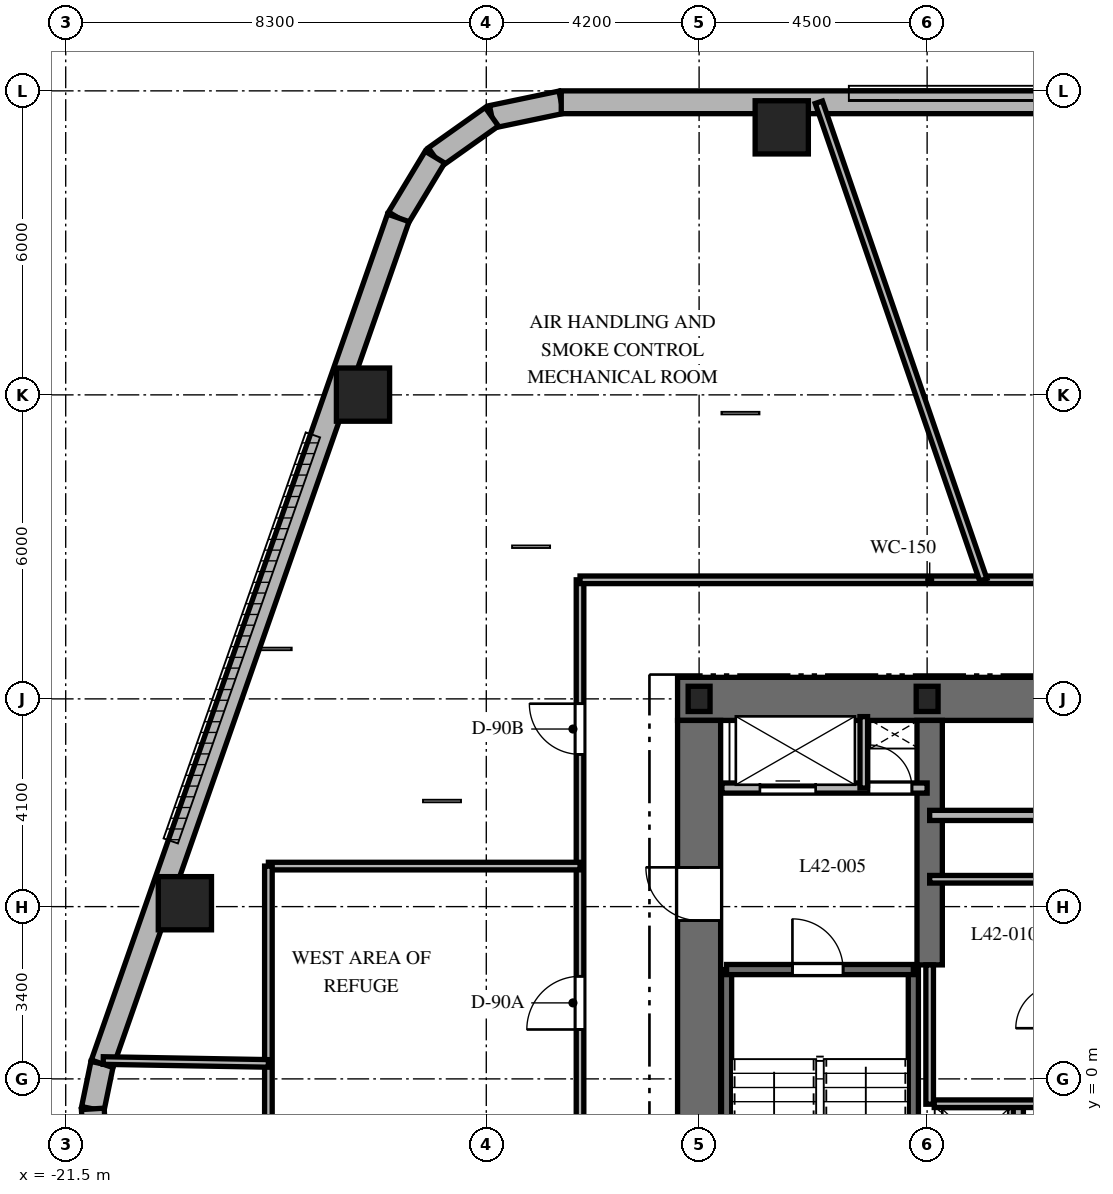
"""IFC4 building model, lengths in metres.
Left out: names, types, materials, properties, quantities, classifications, styles, units other than length and angle.
Written with IfcOpenShell. Run it as: python <this file> out.ifc"""

import sys

from ifc_helpers import new_model, si_unit, direction, frame, frame_2d, origin, origin_2d, place, context, subcontext, project, spatial, rectangle, i_section, extrude, element, fill, save


model = new_model("IFC4")
c1 = context("Model", 3, precision=1e-05, world=origin(), true_north=direction((0.0, 1.0)))
c2 = subcontext(c1, "Body", "Model", "MODEL_VIEW")
j1 = project(units=[si_unit("LENGTHUNIT", "METRE"), si_unit("PLANEANGLEUNIT", "RADIAN")], contexts=[c1])
p1 = place(None, origin())
s1 = spatial("IfcSite", under=j1, at=p1, CompositionType="ELEMENT")
p2 = place(p1, origin())
s2 = spatial("IfcBuilding", under=s1, at=p2, CompositionType="ELEMENT")
p3 = place(p2, frame((0.0, 0.0, 170.2)))
s3 = spatial("IfcBuildingStorey", under=s2, at=p3, CompositionType="ELEMENT", Elevation=170.2)
p4 = place(p3, frame((-9.425, 7.5, 0.0), z_axis=(0.0, 0.0, 1.0), x_axis=(1.0, 0.0, 0.0)))
e1 = element("IfcWall", 1, at=p4, inside=s3, PredefinedType="SHEAR", context=c2, shape_type="SweptSolid", body=[
    extrude(rectangle(XDim=9.475, YDim=0.85, at=frame_2d((4.738, 0.0))), origin(), (0.0, 0.0, 1.0), 5.4),
])
p5 = place(p3, frame((-9.0, -7.075, 0.0), z_axis=(0.0, 0.0, 1.0), x_axis=(0.0, 1.0, 0.0)))
e2 = element("IfcWall", 2, at=p5, inside=s3, PredefinedType="SHEAR", context=c2, shape_type="SweptSolid", body=[
    extrude(rectangle(XDim=14.15, YDim=0.85, at=frame_2d((7.075, 0.0))), origin(), (0.0, 0.0, 1.0), 5.4),
])
p6 = place(p5, frame((10.2, 0.0, 0.0)))
e3 = element("IfcOpeningElement", 3, at=p6, cuts=e2, PredefinedType="OPENING", context=c2, shape_type="SweptSolid", body=[
    extrude(rectangle(XDim=1.05, YDim=2.15, at=frame_2d((0.525, 1.075))), frame((0.0, 0.435, 0.0), z_axis=(0.0, -1.0, 0.0), x_axis=(1.0, 0.0, 0.0)), (0.0, 0.0, 1.0), 0.87),
])
p7 = place(p3, frame((-4.45, 2.25, 0.0), z_axis=(0.0, 0.0, 1.0), x_axis=(0.0, 1.0, 0.0)))
e4 = element("IfcWall", 4, at=p7, inside=s3, PredefinedType="SHEAR", context=c2, shape_type="SweptSolid", body=[
    extrude(rectangle(XDim=4.825, YDim=0.5, at=frame_2d((2.413, 0.0))), origin(), (0.0, 0.0, 1.0), 5.4),
])
for number, where, z_axis, x_axis in (
    (5, (-8.458, -6.985, 0.0), (0.0, 0.0, 1.0), (0.0, 1.0, 0.0)),
    (6, (-4.772, -6.985, 0.0), (0.0, 0.0, 1.0), (0.0, 1.0, 0.0)),
):
    element("IfcWall", number, at=place(p3, frame(where, z_axis=z_axis, x_axis=x_axis)), inside=s3, PredefinedType="SHEAR", context=c2, shape_type="SweptSolid", body=[
        extrude(rectangle(XDim=9.143, YDim=0.2, at=frame_2d((4.572, 0.0))), origin(), (0.0, 0.0, 1.0), 5.4),
    ])
p8 = place(p3, frame((-8.458, 2.158, 0.0), z_axis=(0.0, 0.0, 1.0), x_axis=(1.0, 0.0, 0.0)))
e7 = element("IfcWall", 7, at=p8, inside=s3, PredefinedType="SHEAR", context=c2, shape_type="SweptSolid", body=[
    extrude(rectangle(XDim=3.686, YDim=0.2, at=frame_2d((1.843, 0.0))), origin(), (0.0, 0.0, 1.0), 5.4),
])
p9 = place(p8, frame((1.3, 0.0, 0.0)))
e8 = element("IfcOpeningElement", 8, at=p9, cuts=e7, PredefinedType="OPENING", context=c2, shape_type="SweptSolid", body=[
    extrude(rectangle(XDim=1.0, YDim=2.15, at=frame_2d((0.5, 1.075))), frame((0.0, 0.11, 0.0), z_axis=(0.0, -1.0, 0.0), x_axis=(1.0, 0.0, 0.0)), (0.0, 0.0, 1.0), 0.22),
])
for number, where, z_axis, x_axis in (
    (9, (-4.5, 7.5, 0.0), (0.0, 0.0, 1.0), (1.0, 0.0, 0.0)),
    (10, (-9.0, 7.5, 0.0), (0.0, 0.0, 1.0), (1.0, 0.0, 0.0)),
):
    element("IfcColumn", number, at=place(p3, frame(where, z_axis=z_axis, x_axis=x_axis)), inside=s3, PredefinedType="COLUMN", context=c2, shape_type="SweptSolid", body=[
        extrude(i_section(OverallWidth=0.432, OverallDepth=0.498, WebThickness=0.056, FlangeThickness=0.089, at=origin_2d()), origin(), (0.0, 0.0, 1.0), 5.4),
    ])
for number, where, z_axis, x_axis in (
    (11, (-7.369, 18.78, 0.0), (0.0, 0.0, 1.0), (1.0, 0.0, 0.0)),
    (12, (-15.633, 13.505, 0.0), (0.0, 0.0, 1.0), (1.0, 0.0, 0.0)),
    (13, (-19.148, 3.467, 0.0), (0.0, 0.0, 1.0), (1.0, 0.0, 0.0)),
):
    element("IfcColumn", number, at=place(p3, frame(where, z_axis=z_axis, x_axis=x_axis)), inside=s3, PredefinedType="COLUMN", context=c2, shape_type="SweptSolid", body=[
        extrude(rectangle(XDim=1.05, YDim=1.05, at=origin_2d()), origin(), (0.0, 0.0, 1.0), 5.4),
    ])
p10 = place(p3, frame((-11.72, 19.275, 0.0), z_axis=(0.0, 0.0, 1.0), x_axis=(-0.97893106758, -0.204191001093, 0.0)))
e14 = element("IfcWall", 14, at=p10, inside=s3, PredefinedType="SOLIDWALL", context=c2, shape_type="SweptSolid", body=[
    extrude(rectangle(XDim=1.4, YDim=0.45, at=frame_2d((0.7, 0.0))), origin(), (0.0, 0.0, 1.0), 5.1),
])
p11 = place(p3, frame((-13.091, 18.989, 0.0), z_axis=(0.0, 0.0, 1.0), x_axis=(-0.815574637848, -0.578651890258, 0.0)))
e15 = element("IfcWall", 15, at=p11, inside=s3, PredefinedType="SOLIDWALL", context=c2, shape_type="SweptSolid", body=[
    extrude(rectangle(XDim=1.377, YDim=0.45, at=frame_2d((0.688, 0.0))), origin(), (0.0, 0.0, 1.0), 5.1),
])
p12 = place(p3, frame((-14.214, 18.192, 0.0), z_axis=(0.0, 0.0, 1.0), x_axis=(-0.516340945502, -0.856383108193, 0.0)))
e16 = element("IfcWall", 16, at=p12, inside=s3, PredefinedType="SOLIDWALL", context=c2, shape_type="SweptSolid", body=[
    extrude(rectangle(XDim=1.4, YDim=0.45, at=frame_2d((0.7, 0.0))), origin(), (0.0, 0.0, 1.0), 5.1),
])
p13 = place(p3, frame((-20.782, 0.298, 0.0), z_axis=(0.0, 0.0, 1.0), x_axis=(-0.202570068411, -0.979267771033, 0.0)))
e17 = element("IfcWall", 17, at=p13, inside=s3, PredefinedType="SOLIDWALL", context=c2, shape_type="SweptSolid", body=[
    extrude(rectangle(XDim=0.909, YDim=0.45, at=frame_2d((0.454, 0.0))), origin(), (0.0, 0.0, 1.0), 5.1),
])
p14 = place(p3, frame((-20.966, -0.592, 0.0), z_axis=(0.0, 0.0, 1.0), x_axis=(0.061748898935, -0.998091715966, 0.0)))
e18 = element("IfcWall", 18, at=p14, inside=s3, PredefinedType="SOLIDWALL", context=c2, shape_type="SweptSolid", body=[
    extrude(rectangle(XDim=0.894, YDim=0.45, at=frame_2d((0.447, 0.0))), origin(), (0.0, 0.0, 1.0), 5.1),
])
p15 = place(p3, frame((10.108, 19.275, 0.0), z_axis=(0.0, 0.0, 1.0), x_axis=(-1.0, 0.0, 0.0)))
e19 = element("IfcWall", 19, at=p15, inside=s3, PredefinedType="SOLIDWALL", context=c2, shape_type="SweptSolid", body=[
    extrude(rectangle(XDim=21.829, YDim=0.45, at=frame_2d((10.915, 0.0))), origin(), (0.0, 0.0, 1.0), 5.1),
])
p16 = place(p3, frame((-14.937, 16.993, 0.0), z_axis=(0.0, 0.0, 1.0), x_axis=(-0.330431575061, -0.943829949834, 0.0)))
e20 = element("IfcWall", 20, at=p16, inside=s3, PredefinedType="SOLIDWALL", context=c2, shape_type="SweptSolid", body=[
    extrude(rectangle(XDim=17.689, YDim=0.45, at=frame_2d((8.844, 0.0))), origin(), (0.0, 0.0, 1.0), 5.1),
])
p17 = place(p3, frame((-8.55, 5.74, 0.0), z_axis=(0.0, 0.0, 1.0), x_axis=(1.0, 0.0, 0.0)))
e21 = element("IfcWall", 21, at=p17, inside=s3, PredefinedType="PARTITIONING", context=c2, shape_type="SweptSolid", body=[
    extrude(rectangle(XDim=4.05, YDim=0.2, at=frame_2d((2.025, 0.0))), origin(), (0.0, 0.0, 1.0), 5.1),
])
p18 = place(p17, frame((0.75, 0.0, 0.0)))
e22 = element("IfcOpeningElement", 22, at=p18, cuts=e21, PredefinedType="OPENING", context=c2, shape_type="SweptSolid", body=[
    extrude(rectangle(XDim=1.1, YDim=2.2, at=frame_2d((0.55, 1.1))), frame((0.0, 0.11, 0.0), z_axis=(0.0, -1.0, 0.0), x_axis=(1.0, 0.0, 0.0)), (0.0, 0.0, 1.0), 0.22),
])
p19 = place(p17, frame((2.9, 0.0, 0.0)))
e23 = element("IfcOpeningElement", 23, at=p19, cuts=e21, PredefinedType="OPENING", context=c2, shape_type="SweptSolid", body=[
    extrude(rectangle(XDim=0.85, YDim=2.03, at=frame_2d((0.425, 1.015))), frame((0.0, 0.11, 0.0), z_axis=(0.0, -1.0, 0.0), x_axis=(1.0, 0.0, 0.0)), (0.0, 0.0, 1.0), 0.22),
])
p20 = place(p3, frame((-5.75, 5.74, 0.0), z_axis=(0.0, 0.0, 1.0), x_axis=(0.0, 1.0, 0.0)))
e24 = element("IfcWall", 24, at=p20, inside=s3, PredefinedType="PARTITIONING", context=c2, shape_type="SweptSolid", body=[
    extrude(rectangle(XDim=1.41, YDim=0.15, at=frame_2d((0.705, 0.0))), origin(), (0.0, 0.0, 1.0), 5.1),
])
p21 = place(p3, frame((-2.7, -1.972, 0.0), z_axis=(0.0, 0.0, 1.0), x_axis=(0.0, 1.0, 0.0)))
e25 = element("IfcWall", 25, at=p21, inside=s3, PredefinedType="PARTITIONING", context=c2, shape_type="SweptSolid", body=[
    extrude(rectangle(XDim=1.472, YDim=0.2, at=frame_2d((0.736, 0.0))), origin(), (0.0, 0.0, 1.0), 5.1),
])
p22 = place(p21, frame((0.24, 0.0, 0.0)))
e26 = element("IfcOpeningElement", 26, at=p22, cuts=e25, PredefinedType="OPENING", context=c2, shape_type="SweptSolid", body=[
    extrude(rectangle(XDim=1.0, YDim=2.2, at=frame_2d((0.5, 1.1))), frame((0.0, 0.11, 0.0), z_axis=(0.0, -1.0, 0.0), x_axis=(1.0, 0.0, 0.0)), (0.0, 0.0, 1.0), 0.22),
])
p23 = place(p3, frame((-4.45, 5.2, 0.0), z_axis=(0.0, 0.0, 1.0), x_axis=(1.0, 0.0, 0.0)))
e27 = element("IfcWall", 27, at=p23, inside=s3, PredefinedType="PARTITIONING", context=c2, shape_type="SweptSolid", body=[
    extrude(rectangle(XDim=4.5, YDim=0.2, at=frame_2d((2.25, 0.0))), origin(), (0.0, 0.0, 1.0), 5.1),
])
p24 = place(p3, frame((-4.45, -0.5, 0.0), z_axis=(0.0, 0.0, 1.0), x_axis=(0.0, 1.0, 0.0)))
e28 = element("IfcWall", 28, at=p24, inside=s3, PredefinedType="PARTITIONING", context=c2, shape_type="SweptSolid", body=[
    extrude(rectangle(XDim=2.75, YDim=0.15, at=frame_2d((1.375, 0.0))), origin(), (0.0, 0.0, 1.0), 5.1),
])
p25 = place(p3, frame((-4.45, 3.94, 0.0), z_axis=(0.0, 0.0, 1.0), x_axis=(1.0, 0.0, 0.0)))
e29 = element("IfcWall", 29, at=p25, inside=s3, PredefinedType="PARTITIONING", context=c2, shape_type="SweptSolid", body=[
    extrude(rectangle(XDim=2.55, YDim=0.15, at=frame_2d((1.275, 0.0))), origin(), (0.0, 0.0, 1.0), 5.1),
])
p26 = place(p3, frame((-4.36, -0.49, 0.0), z_axis=(0.0, 0.0, 1.0), x_axis=(1.0, 0.0, 0.0)))
e30 = element("IfcWall", 30, at=p26, inside=s3, PredefinedType="PARTITIONING", context=c2, shape_type="SweptSolid", body=[
    extrude(rectangle(XDim=8.72, YDim=0.15, at=frame_2d((4.36, 0.0))), origin(), (0.0, 0.0, 1.0), 5.1),
])
p27 = place(p26, frame((3.86, 0.0, 0.0)))
e31 = element("IfcOpeningElement", 31, at=p27, cuts=e30, PredefinedType="OPENING", context=c2, shape_type="SweptSolid", body=[
    extrude(rectangle(XDim=0.9, YDim=2.03, at=frame_2d((0.45, 1.015))), frame((0.0, 0.085, 0.0), z_axis=(0.0, -1.0, 0.0), x_axis=(1.0, 0.0, 0.0)), (0.0, 0.0, 1.0), 0.17),
])
p28 = place(p3, frame((-11.35, -9.85, 0.0), z_axis=(0.0, 0.0, 1.0), x_axis=(0.0, 1.0, 0.0)))
e32 = element("IfcWall", 32, at=p28, inside=s3, PredefinedType="PARTITIONING", context=c2, shape_type="SweptSolid", body=[
    extrude(rectangle(XDim=19.7, YDim=0.15, at=frame_2d((9.85, 0.0))), origin(), (0.0, 0.0, 1.0), 4.316),
])
p29 = place(p28, frame((10.825, 0.0, 0.0)))
e33 = element("IfcOpeningElement", 33, at=p29, cuts=e32, PredefinedType="OPENING", context=c2, shape_type="SweptSolid", body=[
    extrude(rectangle(XDim=1.05, YDim=2.15, at=frame_2d((0.525, 1.075))), frame((0.0, 0.085, 0.0), z_axis=(0.0, -1.0, 0.0), x_axis=(1.0, 0.0, 0.0)), (0.0, 0.0, 1.0), 0.17),
])
p30 = place(p28, frame((16.255, 0.0, 0.0)))
e34 = element("IfcOpeningElement", 34, at=p30, cuts=e32, PredefinedType="OPENING", context=c2, shape_type="SweptSolid", body=[
    extrude(rectangle(XDim=1.0, YDim=2.15, at=frame_2d((0.5, 1.075))), frame((0.0, 0.085, 0.0), z_axis=(0.0, -1.0, 0.0), x_axis=(1.0, 0.0, 0.0)), (0.0, 0.0, 1.0), 0.17),
])
p31 = place(p28, frame((3.945, 0.0, 0.0)))
e35 = element("IfcOpeningElement", 35, at=p31, cuts=e32, PredefinedType="OPENING", context=c2, shape_type="SweptSolid", body=[
    extrude(rectangle(XDim=1.0, YDim=2.15, at=frame_2d((0.5, 1.075))), frame((0.0, 0.085, 0.0), z_axis=(0.0, -1.0, 0.0), x_axis=(1.0, 0.0, 0.0)), (0.0, 0.0, 1.0), 0.17),
])
p32 = place(p3, frame((-11.35, 9.85, 0.0), z_axis=(0.0, 0.0, 1.0), x_axis=(1.0, 0.0, 0.0)))
e36 = element("IfcWall", 36, at=p32, inside=s3, PredefinedType="PARTITIONING", context=c2, shape_type="SweptSolid", body=[
    extrude(rectangle(XDim=22.7, YDim=0.15, at=frame_2d((11.35, 0.0))), origin(), (0.0, 0.0, 1.0), 4.316),
])
p33 = place(p32, frame((14.702, 0.0, 0.0)))
e37 = element("IfcOpeningElement", 37, at=p33, cuts=e36, PredefinedType="OPENING", context=c2, shape_type="SweptSolid", body=[
    extrude(rectangle(XDim=1.0, YDim=2.15, at=frame_2d((0.5, 1.075))), frame((0.0, 0.085, 0.0), z_axis=(0.0, -1.0, 0.0), x_axis=(1.0, 0.0, 0.0)), (0.0, 0.0, 1.0), 0.17),
])
p34 = place(p3, frame((-17.5, 4.2, 0.0), z_axis=(0.0, 0.0, 1.0), x_axis=(1.0, 0.0, 0.0)))
e38 = element("IfcWall", 38, at=p34, inside=s3, PredefinedType="PARTITIONING", context=c2, shape_type="SweptSolid", body=[
    extrude(rectangle(XDim=6.15, YDim=0.15, at=frame_2d((3.075, 0.0))), origin(), (0.0, 0.0, 1.0), 4.316),
])
p35 = place(p3, frame((-17.5, -1.2, 0.0), z_axis=(0.0, 0.0, 1.0), x_axis=(0.0, 1.0, 0.0)))
e39 = element("IfcWall", 39, at=p35, inside=s3, PredefinedType="PARTITIONING", context=c2, shape_type="SweptSolid", body=[
    extrude(rectangle(XDim=5.4, YDim=0.15, at=frame_2d((2.7, 0.0))), origin(), (0.0, 0.0, 1.0), 4.316),
])
p36 = place(p3, frame((-3.392, 9.85, 0.0), z_axis=(0.0, 0.0, 1.0), x_axis=(-0.325580784727, 0.945514226554, 0.0)))
e40 = element("IfcWall", 40, at=p36, inside=s3, PredefinedType="PARTITIONING", context=c2, shape_type="SweptSolid", body=[
    extrude(rectangle(XDim=9.968, YDim=0.15, at=frame_2d((4.984, 0.0))), origin(), (0.0, 0.0, 1.0), 4.34),
])
p37 = place(p3, frame((-17.5, 0.305, 0.0), z_axis=(0.0, 0.0, 1.0), x_axis=(-0.99984772798, 0.017450525889, 0.0)))
e41 = element("IfcWall", 41, at=p37, inside=s3, PredefinedType="PARTITIONING", context=c2, shape_type="SweptSolid", body=[
    extrude(rectangle(XDim=3.26, YDim=0.15, at=frame_2d((1.63, 0.0))), origin(), (0.0, 0.0, 1.0), 4.34),
])
p38 = place(p9, origin())
e42 = element("IfcDoor", 42, at=p38, inside=s3, OperationType="SINGLE_SWING_LEFT", PredefinedType="DOOR", context=c2, shape_type="SweptSolid", body=[
    extrude(rectangle(XDim=1.0, YDim=2.15, at=frame_2d((0.5, 1.075))), frame((0.0, 0.025, 0.0), z_axis=(0.0, -1.0, 0.0), x_axis=(1.0, 0.0, 0.0)), (0.0, 0.0, 1.0), 0.05),
])
fill(e8, e42)
p39 = place(p6, origin())
e43 = element("IfcDoor", 43, at=p39, inside=s3, OperationType="SINGLE_SWING_RIGHT", PredefinedType="DOOR", context=c2, shape_type="SweptSolid", body=[
    extrude(rectangle(XDim=1.05, YDim=2.15, at=frame_2d((0.525, 1.075))), frame((0.0, 0.025, 0.0), z_axis=(0.0, -1.0, 0.0), x_axis=(1.0, 0.0, 0.0)), (0.0, 0.0, 1.0), 0.05),
])
fill(e3, e43)
p40 = place(p18, origin())
e44 = element("IfcDoor", 44, at=p40, inside=s3, OperationType="SLIDING_TO_LEFT", PredefinedType="DOOR", context=c2, shape_type="SweptSolid", body=[
    extrude(rectangle(XDim=1.1, YDim=2.2, at=frame_2d((0.55, 1.1))), frame((0.0, 0.025, 0.0), z_axis=(0.0, -1.0, 0.0), x_axis=(1.0, 0.0, 0.0)), (0.0, 0.0, 1.0), 0.05),
])
fill(e22, e44)
p41 = place(p19, origin())
e45 = element("IfcDoor", 45, at=p41, inside=s3, OperationType="SINGLE_SWING_LEFT", PredefinedType="DOOR", context=c2, shape_type="SweptSolid", body=[
    extrude(rectangle(XDim=0.85, YDim=2.03, at=frame_2d((0.425, 1.015))), frame((0.0, 0.025, 0.0), z_axis=(0.0, -1.0, 0.0), x_axis=(1.0, 0.0, 0.0)), (0.0, 0.0, 1.0), 0.05),
])
fill(e23, e45)
p42 = place(p29, origin())
e46 = element("IfcDoor", 46, at=p42, inside=s3, OperationType="SINGLE_SWING_LEFT", PredefinedType="DOOR", context=c2, shape_type="SweptSolid", body=[
    extrude(rectangle(XDim=1.05, YDim=2.15, at=frame_2d((0.525, 1.075))), frame((0.0, 0.025, 0.0), z_axis=(0.0, -1.0, 0.0), x_axis=(1.0, 0.0, 0.0)), (0.0, 0.0, 1.0), 0.05),
])
fill(e33, e46)
p43 = place(p30, origin())
e47 = element("IfcDoor", 47, at=p43, inside=s3, OperationType="SINGLE_SWING_RIGHT", PredefinedType="DOOR", context=c2, shape_type="SweptSolid", body=[
    extrude(rectangle(XDim=1.0, YDim=2.15, at=frame_2d((0.5, 1.075))), frame((0.0, 0.025, 0.0), z_axis=(0.0, -1.0, 0.0), x_axis=(1.0, 0.0, 0.0)), (0.0, 0.0, 1.0), 0.05),
])
fill(e34, e47)
save(model, sys.argv[1])
